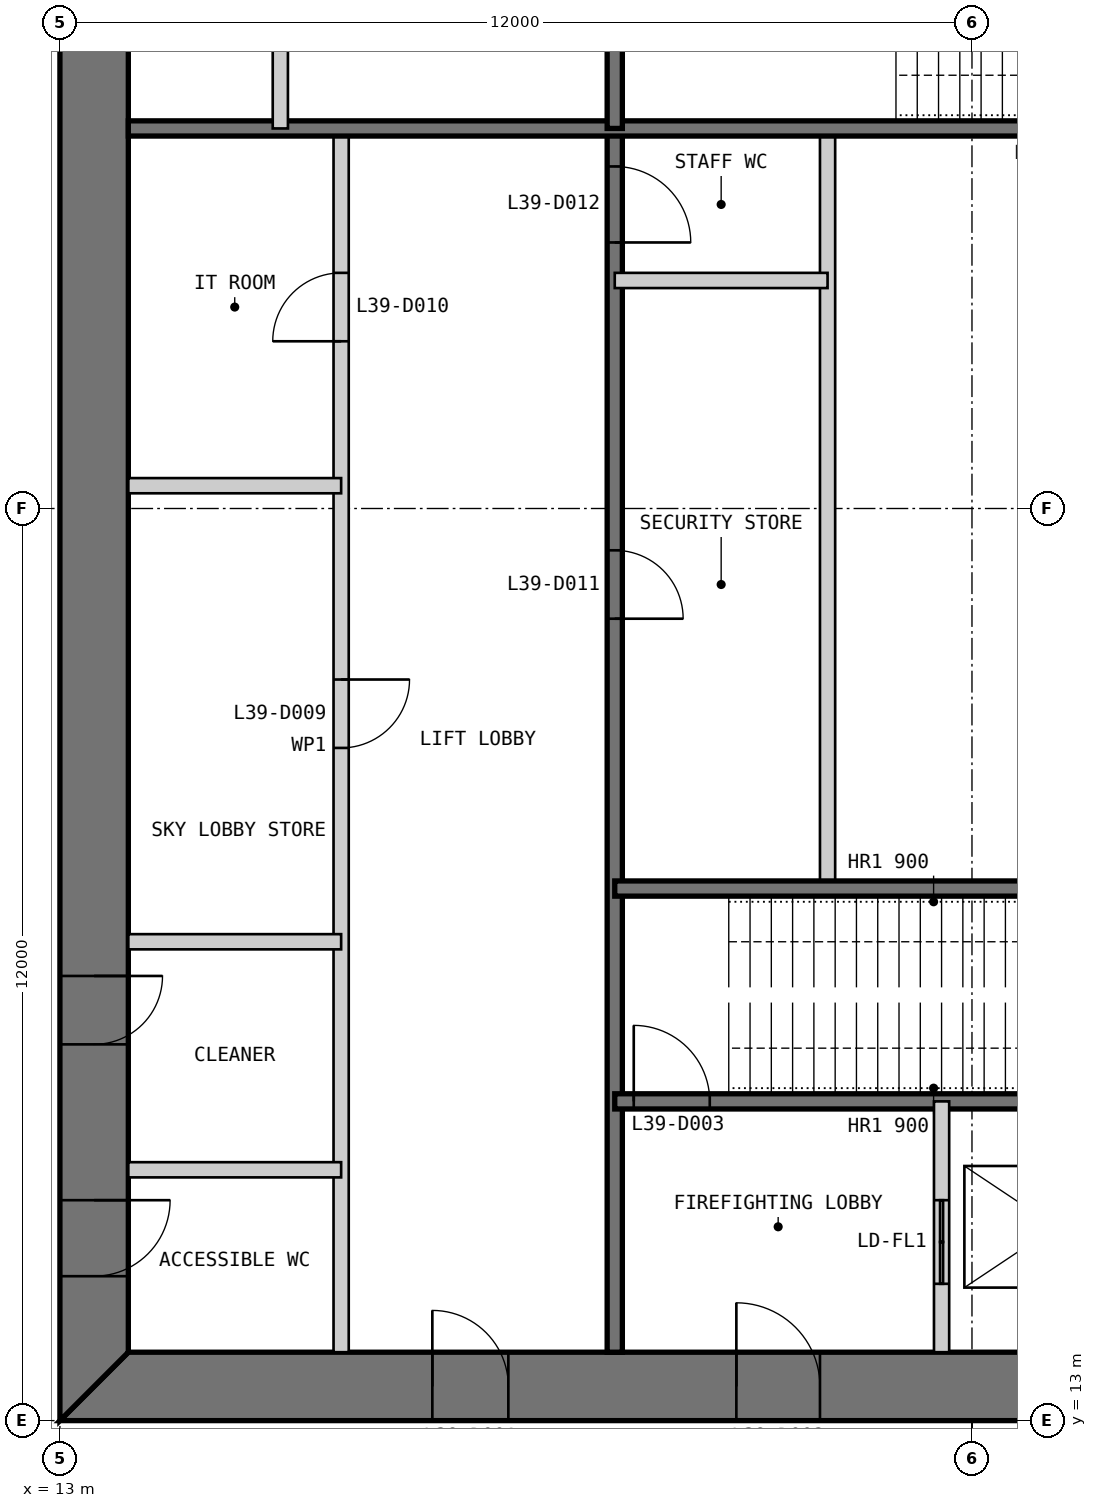
"""IFC4 building model, lengths in metres.
Left out: names, types, materials, properties, quantities, classifications, styles, units other than length and angle.
Written with IfcOpenShell. Run it as: python <this file> out.ifc"""

import sys

from ifc_helpers import new_model, si_unit, direction, frame, frame_2d, origin, place, context, subcontext, project, spatial, polyline, rectangle, outline, extrude, element, fill, save


model = new_model("IFC4")
c1 = context("Model", 3, precision=1e-05, world=origin(), true_north=direction((0.0, 1.0)))
c2 = subcontext(c1, "Body", "Model", "MODEL_VIEW")
j1 = project(units=[si_unit("LENGTHUNIT", "METRE"), si_unit("PLANEANGLEUNIT", "RADIAN")], contexts=[c1])
p1 = place(None, origin())
s1 = spatial("IfcSite", under=j1, at=p1, CompositionType="ELEMENT")
p2 = place(p1, origin())
s2 = spatial("IfcBuilding", under=s1, at=p2, CompositionType="ELEMENT")
p3 = place(p2, frame((0.0, 0.0, 168.4)))
s3 = spatial("IfcBuildingStorey", under=s2, at=p3, CompositionType="ELEMENT", Elevation=168.4)
p4 = place(p3, frame((13.0, 13.45, 0.0), z_axis=(0.0, 0.0, 1.0), x_axis=(1.0, 0.0, 0.0)))
e1 = element("IfcWall", 1, at=p4, inside=s3, PredefinedType="SHEAR", context=c2, shape_type="SweptSolid", body=[
    extrude(outline(polyline([(0.0, -0.45), (24.0, -0.45), (23.1, 0.45), (0.9, 0.45), (0.0, -0.45)])), origin(), (0.0, 0.0, 1.0), 5.4),
])
p5 = place(p4, frame((4.9, 0.0, 0.0)))
e2 = element("IfcOpeningElement", 2, at=p5, cuts=e1, PredefinedType="OPENING", context=c2, shape_type="SweptSolid", body=[
    extrude(rectangle(XDim=1.0, YDim=2.2, at=frame_2d((0.5, 1.1))), frame((0.0, 0.46, 0.0), z_axis=(0.0, -1.0, 0.0), x_axis=(1.0, 0.0, 0.0)), (0.0, 0.0, 1.0), 0.92),
])
p6 = place(p4, frame((8.9, 0.0, 0.0)))
e3 = element("IfcOpeningElement", 3, at=p6, cuts=e1, PredefinedType="OPENING", context=c2, shape_type="SweptSolid", body=[
    extrude(rectangle(XDim=1.1, YDim=2.2, at=frame_2d((0.55, 1.1))), frame((0.0, 0.46, 0.0), z_axis=(0.0, -1.0, 0.0), x_axis=(1.0, 0.0, 0.0)), (0.0, 0.0, 1.0), 0.92),
])
p7 = place(p4, frame((15.05, 0.0, 0.0)))
e4 = element("IfcOpeningElement", 4, at=p7, cuts=e1, PredefinedType="OPENING", context=c2, shape_type="SweptSolid", body=[
    extrude(rectangle(XDim=0.9, YDim=2.2, at=frame_2d((0.45, 1.1))), frame((0.0, 0.46, 0.0), z_axis=(0.0, -1.0, 0.0), x_axis=(1.0, 0.0, 0.0)), (0.0, 0.0, 1.0), 0.92),
])
p8 = place(p4, frame((17.9, 0.0, 0.0)))
e5 = element("IfcOpeningElement", 5, at=p8, cuts=e1, PredefinedType="OPENING", context=c2, shape_type="SweptSolid", body=[
    extrude(rectangle(XDim=1.0, YDim=2.2, at=frame_2d((0.5, 1.1))), frame((0.0, 0.46, 0.0), z_axis=(0.0, -1.0, 0.0), x_axis=(1.0, 0.0, 0.0)), (0.0, 0.0, 1.0), 0.92),
])
p9 = place(p4, frame((21.4, 0.0, 0.0)))
e6 = element("IfcOpeningElement", 6, at=p9, cuts=e1, PredefinedType="OPENING", context=c2, shape_type="SweptSolid", body=[
    extrude(rectangle(XDim=1.0, YDim=2.2, at=frame_2d((0.5, 1.1))), frame((0.0, 0.46, 0.0), z_axis=(0.0, -1.0, 0.0), x_axis=(1.0, 0.0, 0.0)), (0.0, 0.0, 1.0), 0.92),
])
p10 = place(p3, frame((13.45, 36.1, 0.0), z_axis=(0.0, 0.0, 1.0), x_axis=(0.0, -1.0, 0.0)))
e7 = element("IfcWall", 7, at=p10, inside=s3, PredefinedType="SHEAR", context=c2, shape_type="SweptSolid", body=[
    extrude(outline(polyline([(-0.9, -0.45), (23.1, -0.45), (22.2, 0.45), (0.0, 0.45), (-0.9, -0.45)])), origin(), (0.0, 0.0, 1.0), 5.4),
])
p11 = place(p10, frame((20.2, 0.0, 0.0)))
e8 = element("IfcOpeningElement", 8, at=p11, cuts=e7, PredefinedType="OPENING", context=c2, shape_type="SweptSolid", body=[
    extrude(rectangle(XDim=1.0, YDim=2.2, at=frame_2d((0.5, 1.1))), frame((0.0, 0.46, 0.0), z_axis=(0.0, -1.0, 0.0), x_axis=(1.0, 0.0, 0.0)), (0.0, 0.0, 1.0), 0.92),
])
p12 = place(p10, frame((17.25, 0.0, 0.0)))
e9 = element("IfcOpeningElement", 9, at=p12, cuts=e7, PredefinedType="OPENING", context=c2, shape_type="SweptSolid", body=[
    extrude(rectangle(XDim=0.9, YDim=2.2, at=frame_2d((0.45, 1.1))), frame((0.0, 0.46, 0.0), z_axis=(0.0, -1.0, 0.0), x_axis=(1.0, 0.0, 0.0)), (0.0, 0.0, 1.0), 0.92),
])
p13 = place(p3, frame((16.7, 13.9, 0.0), z_axis=(0.0, 0.0, 1.0), x_axis=(0.0, 1.0, 0.0)))
e10 = element("IfcWall", 10, at=p13, inside=s3, PredefinedType="PARTITIONING", context=c2, shape_type="SweptSolid", body=[
    extrude(rectangle(XDim=16.1, YDim=0.2, at=frame_2d((8.05, 0.0))), origin(), (0.0, 0.0, 1.0), 5.2),
])
p14 = place(p13, frame((7.95, 0.0, 0.0)))
e11 = element("IfcOpeningElement", 11, at=p14, cuts=e10, PredefinedType="OPENING", context=c2, shape_type="SweptSolid", body=[
    extrude(rectangle(XDim=0.9, YDim=2.2, at=frame_2d((0.45, 1.1))), frame((0.0, 0.11, 0.0), z_axis=(0.0, -1.0, 0.0), x_axis=(1.0, 0.0, 0.0)), (0.0, 0.0, 1.0), 0.22),
])
p15 = place(p13, frame((13.3, 0.0, 0.0)))
e12 = element("IfcOpeningElement", 12, at=p15, cuts=e10, PredefinedType="OPENING", context=c2, shape_type="SweptSolid", body=[
    extrude(rectangle(XDim=0.9, YDim=2.2, at=frame_2d((0.45, 1.1))), frame((0.0, 0.11, 0.0), z_axis=(0.0, -1.0, 0.0), x_axis=(1.0, 0.0, 0.0)), (0.0, 0.0, 1.0), 0.22),
])
p16 = place(p3, frame((20.3, 13.9, 0.0), z_axis=(0.0, 0.0, 1.0), x_axis=(0.0, 1.0, 0.0)))
e13 = element("IfcWall", 13, at=p16, inside=s3, PredefinedType="SOLIDWALL", context=c2, shape_type="SweptSolid", body=[
    extrude(rectangle(XDim=16.1, YDim=0.2, at=frame_2d((8.05, 0.0))), origin(), (0.0, 0.0, 1.0), 5.2),
])
p17 = place(p16, frame((9.65, 0.0, 0.0)))
e14 = element("IfcOpeningElement", 14, at=p17, cuts=e13, PredefinedType="OPENING", context=c2, shape_type="SweptSolid", body=[
    extrude(rectangle(XDim=0.9, YDim=2.2, at=frame_2d((0.45, 1.1))), frame((0.0, 0.11, 0.0), z_axis=(0.0, -1.0, 0.0), x_axis=(1.0, 0.0, 0.0)), (0.0, 0.0, 1.0), 0.22),
])
p18 = place(p16, frame((14.6, 0.0, 0.0)))
e15 = element("IfcOpeningElement", 15, at=p18, cuts=e13, PredefinedType="OPENING", context=c2, shape_type="SweptSolid", body=[
    extrude(rectangle(XDim=1.0, YDim=2.2, at=frame_2d((0.5, 1.1))), frame((0.0, 0.11, 0.0), z_axis=(0.0, -1.0, 0.0), x_axis=(1.0, 0.0, 0.0)), (0.0, 0.0, 1.0), 0.22),
])
p19 = place(p3, frame((23.1, 20.0, 0.0), z_axis=(0.0, 0.0, 1.0), x_axis=(0.0, 1.0, 0.0)))
e16 = element("IfcWall", 16, at=p19, inside=s3, PredefinedType="PARTITIONING", context=c2, shape_type="SweptSolid", body=[
    extrude(rectangle(XDim=10.0, YDim=0.2, at=frame_2d((5.0, 0.0))), origin(), (0.0, 0.0, 1.0), 5.2),
])
p20 = place(p3, frame((20.3, 17.2, 0.0), z_axis=(0.0, 0.0, 1.0), x_axis=(1.0, 0.0, 0.0)))
e17 = element("IfcWall", 17, at=p20, inside=s3, PredefinedType="SOLIDWALL", context=c2, shape_type="SweptSolid", body=[
    extrude(rectangle(XDim=9.4, YDim=0.2, at=frame_2d((4.7, 0.0))), origin(), (0.0, 0.0, 1.0), 5.2),
])
p21 = place(p20, frame((0.25, 0.0, 0.0)))
e18 = element("IfcOpeningElement", 18, at=p21, cuts=e17, PredefinedType="OPENING", context=c2, shape_type="SweptSolid", body=[
    extrude(rectangle(XDim=1.0, YDim=2.2, at=frame_2d((0.5, 1.1))), frame((0.0, 0.11, 0.0), z_axis=(0.0, -1.0, 0.0), x_axis=(1.0, 0.0, 0.0)), (0.0, 0.0, 1.0), 0.22),
])
p22 = place(p3, frame((20.3, 20.0, 0.0), z_axis=(0.0, 0.0, 1.0), x_axis=(1.0, 0.0, 0.0)))
e19 = element("IfcWall", 19, at=p22, inside=s3, PredefinedType="SOLIDWALL", context=c2, shape_type="SweptSolid", body=[
    extrude(rectangle(XDim=15.8, YDim=0.2, at=frame_2d((7.9, 0.0))), origin(), (0.0, 0.0, 1.0), 5.2),
])
p23 = place(p3, frame((24.6, 13.9, 0.0), z_axis=(0.0, 0.0, 1.0), x_axis=(0.0, 1.0, 0.0)))
e20 = element("IfcWall", 20, at=p23, inside=s3, PredefinedType="PARTITIONING", context=c2, shape_type="SweptSolid", body=[
    extrude(rectangle(XDim=3.3, YDim=0.2, at=frame_2d((1.65, 0.0))), origin(), (0.0, 0.0, 1.0), 5.2),
])
p24 = place(p23, frame((0.9, 0.0, 0.0)))
e21 = element("IfcOpeningElement", 21, at=p24, cuts=e20, PredefinedType="OPENING", context=c2, shape_type="SweptSolid", body=[
    extrude(rectangle(XDim=1.1, YDim=2.2, at=frame_2d((0.55, 1.1))), frame((0.0, 0.11, 0.0), z_axis=(0.0, -1.0, 0.0), x_axis=(1.0, 0.0, 0.0)), (0.0, 0.0, 1.0), 0.22),
])
for number, where, z_axis, x_axis in (
    (22, (13.9, 16.3, 0.0), (0.0, 0.0, 1.0), (1.0, 0.0, 0.0)),
    (23, (13.9, 19.3, 0.0), (0.0, 0.0, 1.0), (1.0, 0.0, 0.0)),
    (24, (13.9, 25.3, 0.0), (0.0, 0.0, 1.0), (1.0, 0.0, 0.0)),
    (25, (20.3, 28.0, 0.0), (0.0, 0.0, 1.0), (1.0, 0.0, 0.0)),
):
    element("IfcWall", number, at=place(p3, frame(where, z_axis=z_axis, x_axis=x_axis)), inside=s3, PredefinedType="PARTITIONING", context=c2, shape_type="SweptSolid", body=[
        extrude(rectangle(XDim=2.8, YDim=0.2, at=frame_2d((1.4, 0.0))), origin(), (0.0, 0.0, 1.0), 5.2),
    ])
p25 = place(p3, frame((29.7, 30.0, 0.0), z_axis=(0.0, 0.0, 1.0), x_axis=(-1.0, 0.0, 0.0)))
e26 = element("IfcWall", 26, at=p25, inside=s3, PredefinedType="SOLIDWALL", context=c2, shape_type="SweptSolid", body=[
    extrude(rectangle(XDim=15.8, YDim=0.2, at=frame_2d((7.9, 0.0))), origin(), (0.0, 0.0, 1.0), 5.2),
])
p26 = place(p3, frame((20.3, 36.1, 0.0), z_axis=(0.0, 0.0, 1.0), x_axis=(0.0, -1.0, 0.0)))
e27 = element("IfcWall", 27, at=p26, inside=s3, PredefinedType="SOLIDWALL", context=c2, shape_type="SweptSolid", body=[
    extrude(rectangle(XDim=6.1, YDim=0.2, at=frame_2d((3.05, 0.0))), origin(), (0.0, 0.0, 1.0), 5.2),
])
p27 = place(p3, frame((15.9, 36.1, 0.0), z_axis=(0.0, 0.0, 1.0), x_axis=(0.0, -1.0, 0.0)))
e28 = element("IfcWall", 28, at=p27, inside=s3, PredefinedType="PARTITIONING", context=c2, shape_type="SweptSolid", body=[
    extrude(rectangle(XDim=6.1, YDim=0.2, at=frame_2d((3.05, 0.0))), origin(), (0.0, 0.0, 1.0), 5.2),
])
p28 = place(p5, origin())
e29 = element("IfcDoor", 29, at=p28, inside=s3, OperationType="SINGLE_SWING_LEFT", PredefinedType="DOOR", context=c2, shape_type="SweptSolid", body=[
    extrude(rectangle(XDim=1.0, YDim=2.2, at=frame_2d((0.5, 1.1))), frame((0.0, 0.025, 0.0), z_axis=(0.0, -1.0, 0.0), x_axis=(1.0, 0.0, 0.0)), (0.0, 0.0, 1.0), 0.05),
    extrude(outline(polyline([(0.0, 0.0), (0.04, 0.0), (0.04, 2.16), (0.96, 2.16), (0.96, 0.0), (1.0, 0.0), (1.0, 2.2), (0.0, 2.2), (0.0, 0.0)])), frame((0.0, 0.3, 0.0), z_axis=(0.0, -1.0, 0.0), x_axis=(1.0, 0.0, 0.0)), (0.0, 0.0, 1.0), 0.6),
])
fill(e2, e29)
p29 = place(p6, origin())
e30 = element("IfcDoor", 30, at=p29, inside=s3, OperationType="SINGLE_SWING_LEFT", PredefinedType="DOOR", context=c2, shape_type="SweptSolid", body=[
    extrude(rectangle(XDim=1.1, YDim=2.2, at=frame_2d((0.55, 1.1))), frame((0.0, 0.025, 0.0), z_axis=(0.0, -1.0, 0.0), x_axis=(1.0, 0.0, 0.0)), (0.0, 0.0, 1.0), 0.05),
    extrude(outline(polyline([(0.0, 0.0), (0.04, 0.0), (0.04, 2.16), (1.06, 2.16), (1.06, 0.0), (1.1, 0.0), (1.1, 2.2), (0.0, 2.2), (0.0, 0.0)])), frame((0.0, 0.3, 0.0), z_axis=(0.0, -1.0, 0.0), x_axis=(1.0, 0.0, 0.0)), (0.0, 0.0, 1.0), 0.6),
])
fill(e3, e30)
p30 = place(p21, origin())
e31 = element("IfcDoor", 31, at=p30, inside=s3, OperationType="SINGLE_SWING_LEFT", PredefinedType="DOOR", context=c2, shape_type="SweptSolid", body=[
    extrude(rectangle(XDim=1.0, YDim=2.2, at=frame_2d((0.5, 1.1))), frame((0.0, 0.025, 0.0), z_axis=(0.0, -1.0, 0.0), x_axis=(1.0, 0.0, 0.0)), (0.0, 0.0, 1.0), 0.05),
])
fill(e18, e31)
p31 = place(p11, origin())
e32 = element("IfcDoor", 32, at=p31, inside=s3, OperationType="SINGLE_SWING_LEFT", PredefinedType="DOOR", context=c2, shape_type="SweptSolid", body=[
    extrude(rectangle(XDim=1.0, YDim=2.2, at=frame_2d((0.5, 1.1))), frame((0.0, 0.025, 0.0), z_axis=(0.0, -1.0, 0.0), x_axis=(1.0, 0.0, 0.0)), (0.0, 0.0, 1.0), 0.05),
    extrude(outline(polyline([(0.0, 0.0), (0.04, 0.0), (0.04, 2.16), (0.96, 2.16), (0.96, 0.0), (1.0, 0.0), (1.0, 2.2), (0.0, 2.2), (0.0, 0.0)])), frame((0.0, 0.3, 0.0), z_axis=(0.0, -1.0, 0.0), x_axis=(1.0, 0.0, 0.0)), (0.0, 0.0, 1.0), 0.6),
])
fill(e8, e32)
p32 = place(p12, origin())
e33 = element("IfcDoor", 33, at=p32, inside=s3, OperationType="SINGLE_SWING_LEFT", PredefinedType="DOOR", context=c2, shape_type="SweptSolid", body=[
    extrude(rectangle(XDim=0.9, YDim=2.2, at=frame_2d((0.45, 1.1))), frame((0.0, 0.025, 0.0), z_axis=(0.0, -1.0, 0.0), x_axis=(1.0, 0.0, 0.0)), (0.0, 0.0, 1.0), 0.05),
    extrude(outline(polyline([(0.0, 0.0), (0.04, 0.0), (0.04, 2.16), (0.86, 2.16), (0.86, 0.0), (0.9, 0.0), (0.9, 2.2), (0.0, 2.2), (0.0, 0.0)])), frame((0.0, 0.3, 0.0), z_axis=(0.0, -1.0, 0.0), x_axis=(1.0, 0.0, 0.0)), (0.0, 0.0, 1.0), 0.6),
])
fill(e9, e33)
p33 = place(p14, frame((0.9, 0.0, 0.0), z_axis=(0.0, 0.0, 1.0), x_axis=(-1.0, 0.0, 0.0)))
e34 = element("IfcDoor", 34, at=p33, inside=s3, OperationType="SINGLE_SWING_LEFT", PredefinedType="DOOR", context=c2, shape_type="SweptSolid", body=[
    extrude(rectangle(XDim=0.9, YDim=2.2, at=frame_2d((0.45, 1.1))), frame((0.0, 0.025, 0.0), z_axis=(0.0, -1.0, 0.0), x_axis=(1.0, 0.0, 0.0)), (0.0, 0.0, 1.0), 0.05),
])
fill(e11, e34)
p34 = place(p15, origin())
e35 = element("IfcDoor", 35, at=p34, inside=s3, OperationType="SINGLE_SWING_LEFT", PredefinedType="DOOR", context=c2, shape_type="SweptSolid", body=[
    extrude(rectangle(XDim=0.9, YDim=2.2, at=frame_2d((0.45, 1.1))), frame((0.0, 0.025, 0.0), z_axis=(0.0, -1.0, 0.0), x_axis=(1.0, 0.0, 0.0)), (0.0, 0.0, 1.0), 0.05),
])
fill(e12, e35)
p35 = place(p17, frame((0.9, 0.0, 0.0), z_axis=(0.0, 0.0, 1.0), x_axis=(-1.0, 0.0, 0.0)))
e36 = element("IfcDoor", 36, at=p35, inside=s3, OperationType="SINGLE_SWING_RIGHT", PredefinedType="DOOR", context=c2, shape_type="SweptSolid", body=[
    extrude(rectangle(XDim=0.9, YDim=2.2, at=frame_2d((0.45, 1.1))), frame((0.0, 0.025, 0.0), z_axis=(0.0, -1.0, 0.0), x_axis=(1.0, 0.0, 0.0)), (0.0, 0.0, 1.0), 0.05),
])
fill(e14, e36)
p36 = place(p18, frame((1.0, 0.0, 0.0), z_axis=(0.0, 0.0, 1.0), x_axis=(-1.0, 0.0, 0.0)))
e37 = element("IfcDoor", 37, at=p36, inside=s3, OperationType="SINGLE_SWING_RIGHT", PredefinedType="DOOR", context=c2, shape_type="SweptSolid", body=[
    extrude(rectangle(XDim=1.0, YDim=2.2, at=frame_2d((0.5, 1.1))), frame((0.0, 0.025, 0.0), z_axis=(0.0, -1.0, 0.0), x_axis=(1.0, 0.0, 0.0)), (0.0, 0.0, 1.0), 0.05),
])
fill(e15, e37)
p37 = place(p24, origin())
e38 = element("IfcDoor", 38, at=p37, inside=s3, OperationType="DOUBLE_DOOR_SLIDING", PredefinedType="DOOR", context=c2, shape_type="SweptSolid", body=[
    extrude(rectangle(XDim=1.1, YDim=2.2, at=frame_2d((0.55, 1.1))), frame((0.0, 0.025, 0.0), z_axis=(0.0, -1.0, 0.0), x_axis=(1.0, 0.0, 0.0)), (0.0, 0.0, 1.0), 0.05),
])
fill(e21, e38)
save(model, sys.argv[1])
